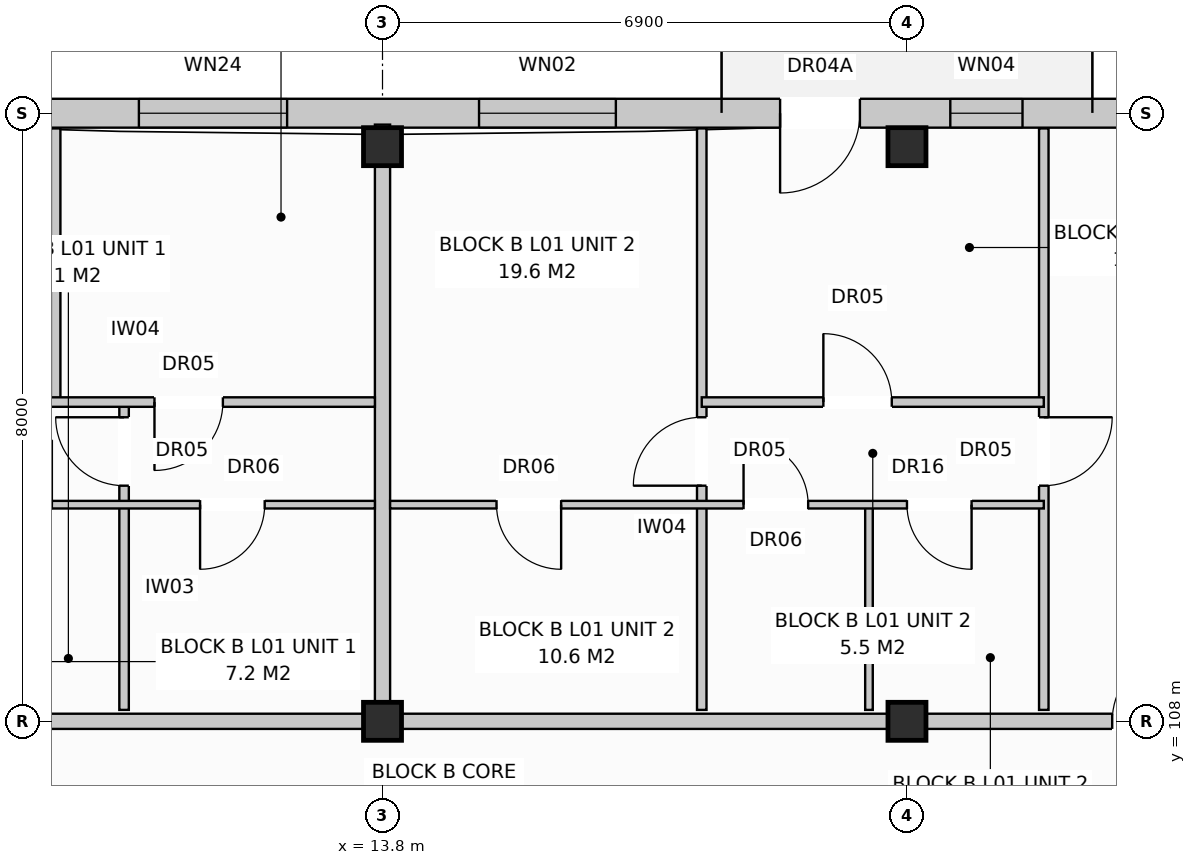
"""IFC4 building model, lengths in metres.
Left out: names, types, materials, properties, quantities, classifications, styles, units other than length and angle.
Written with IfcOpenShell. Run it as: python <this file> out.ifc"""

import sys

from ifc_helpers import new_model, si_unit, direction, frame, frame_2d, origin, origin_with_axes, origin_2d, place, context, subcontext, project, spatial, rectangle, extrude, element, fill, save


model = new_model("IFC4")
c1 = context("Model", 3, precision=1e-05, world=origin(), true_north=direction((0.0, 1.0)))
c2 = subcontext(c1, "Body", "Model", "MODEL_VIEW")
j1 = project(units=[si_unit("LENGTHUNIT", "METRE"), si_unit("PLANEANGLEUNIT", "RADIAN")], contexts=[c1])
p1 = place(None, origin())
s1 = spatial("IfcSite", under=j1, at=p1, CompositionType="ELEMENT")
p2 = place(p1, origin())
s2 = spatial("IfcBuilding", under=s1, at=p2, CompositionType="ELEMENT")
p3 = place(p2, frame((0.0, 0.0, 4.4)))
s3 = spatial("IfcBuildingStorey", under=s2, at=p3, CompositionType="ELEMENT", Elevation=4.4)
for number, where, z_axis, x_axis in (
    (1, (13.8, 108.0, 0.0), (0.0, 0.0, 1.0), (1.0, 0.0, 0.0)),
    (2, (13.8, 115.56, 0.0), (0.0, 0.0, 1.0), (1.0, 0.0, 0.0)),
    (3, (20.7, 108.0, 0.0), (0.0, 0.0, 1.0), (1.0, 0.0, 0.0)),
    (4, (20.7, 115.56, 0.0), (0.0, 0.0, 1.0), (1.0, 0.0, 0.0)),
):
    element("IfcColumn", number, at=place(p3, frame(where, z_axis=z_axis, x_axis=x_axis)), inside=s3, PredefinedType="COLUMN", context=c2, shape_type="SweptSolid", body=[
        extrude(rectangle(XDim=0.5, YDim=0.5, at=origin_2d()), origin(), (0.0, 0.0, 1.0), 3.6),
    ])
p4 = place(p3, frame((0.18, 116.0, 0.0), z_axis=(0.0, 0.0, 1.0), x_axis=(1.0, 0.0, 0.0)))
e5 = element("IfcWall", 5, at=p4, inside=s3, PredefinedType="STANDARD", context=c2, shape_type="SweptSolid", body=[
    extrude(rectangle(XDim=54.84, YDim=0.38, at=frame_2d((27.42, 0.0))), origin(), (0.0, 0.0, 1.0), 3.33),
])
p5 = place(p4, frame((7.34, 0.0, 0.0)))
e6 = element("IfcOpeningElement", 6, at=p5, cuts=e5, PredefinedType="OPENING", context=c2, shape_type="SweptSolid", body=[
    extrude(rectangle(XDim=1.05, YDim=2.12, at=frame_2d((0.525, 1.06))), frame((0.0, 0.202, 0.0), z_axis=(0.0, -1.0, 0.0), x_axis=(1.0, 0.0, 0.0)), (0.0, 0.0, 1.0), 0.404),
])
p6 = place(p4, frame((18.851, 0.0, 0.0)))
e7 = element("IfcOpeningElement", 7, at=p6, cuts=e5, PredefinedType="OPENING", context=c2, shape_type="SweptSolid", body=[
    extrude(rectangle(XDim=1.05, YDim=2.12, at=frame_2d((0.525, 1.06))), frame((0.0, 0.202, 0.0), z_axis=(0.0, -1.0, 0.0), x_axis=(1.0, 0.0, 0.0)), (0.0, 0.0, 1.0), 0.404),
])
p7 = place(p4, frame((32.651, 0.0, 0.0)))
e8 = element("IfcOpeningElement", 8, at=p7, cuts=e5, PredefinedType="OPENING", context=c2, shape_type="SweptSolid", body=[
    extrude(rectangle(XDim=1.05, YDim=2.12, at=frame_2d((0.525, 1.06))), frame((0.0, 0.202, 0.0), z_axis=(0.0, -1.0, 0.0), x_axis=(1.0, 0.0, 0.0)), (0.0, 0.0, 1.0), 0.404),
])
p8 = place(p4, frame((48.74, 0.0, 0.0)))
e9 = element("IfcOpeningElement", 9, at=p8, cuts=e5, PredefinedType="OPENING", context=c2, shape_type="SweptSolid", body=[
    extrude(rectangle(XDim=1.05, YDim=2.12, at=frame_2d((0.525, 1.06))), frame((0.0, 0.202, 0.0), z_axis=(0.0, -1.0, 0.0), x_axis=(1.0, 0.0, 0.0)), (0.0, 0.0, 1.0), 0.404),
])
p9 = place(p4, frame((1.54, 0.0, 0.8)))
e10 = element("IfcOpeningElement", 10, at=p9, cuts=e5, PredefinedType="OPENING", context=c2, shape_type="SweptSolid", body=[
    extrude(rectangle(XDim=1.9, YDim=1.85, at=frame_2d((0.95, 0.925))), frame((0.0, 0.202, 0.0), z_axis=(0.0, -1.0, 0.0), x_axis=(1.0, 0.0, 0.0)), (0.0, 0.0, 1.0), 0.404),
])
p10 = place(p4, frame((10.415, 0.0, 0.8)))
e11 = element("IfcOpeningElement", 11, at=p10, cuts=e5, PredefinedType="OPENING", context=c2, shape_type="SweptSolid", body=[
    extrude(rectangle(XDim=1.95, YDim=1.65, at=frame_2d((0.975, 0.825))), frame((0.0, 0.202, 0.0), z_axis=(0.0, -1.0, 0.0), x_axis=(1.0, 0.0, 0.0)), (0.0, 0.0, 1.0), 0.404),
])
p11 = place(p4, frame((14.89, 0.0, 0.8)))
e12 = element("IfcOpeningElement", 12, at=p11, cuts=e5, PredefinedType="OPENING", context=c2, shape_type="SweptSolid", body=[
    extrude(rectangle(XDim=1.8, YDim=1.7, at=frame_2d((0.9, 0.85))), frame((0.0, 0.202, 0.0), z_axis=(0.0, -1.0, 0.0), x_axis=(1.0, 0.0, 0.0)), (0.0, 0.0, 1.0), 0.404),
])
p12 = place(p4, frame((21.09, 0.0, 0.9)))
e13 = element("IfcOpeningElement", 13, at=p12, cuts=e5, PredefinedType="OPENING", context=c2, shape_type="SweptSolid", body=[
    extrude(rectangle(XDim=0.95, YDim=1.55, at=frame_2d((0.475, 0.775))), frame((0.0, 0.202, 0.0), z_axis=(0.0, -1.0, 0.0), x_axis=(1.0, 0.0, 0.0)), (0.0, 0.0, 1.0), 0.404),
])
p13 = place(p4, frame((23.815, 0.0, 0.8)))
e14 = element("IfcOpeningElement", 14, at=p13, cuts=e5, PredefinedType="OPENING", context=c2, shape_type="SweptSolid", body=[
    extrude(rectangle(XDim=1.95, YDim=1.65, at=frame_2d((0.975, 0.825))), frame((0.0, 0.202, 0.0), z_axis=(0.0, -1.0, 0.0), x_axis=(1.0, 0.0, 0.0)), (0.0, 0.0, 1.0), 0.404),
])
p14 = place(p4, frame((28.49, 0.0, 0.8)))
e15 = element("IfcOpeningElement", 15, at=p14, cuts=e5, PredefinedType="OPENING", context=c2, shape_type="SweptSolid", body=[
    extrude(rectangle(XDim=1.8, YDim=1.7, at=frame_2d((0.9, 0.85))), frame((0.0, 0.202, 0.0), z_axis=(0.0, -1.0, 0.0), x_axis=(1.0, 0.0, 0.0)), (0.0, 0.0, 1.0), 0.404),
])
p15 = place(p4, frame((35.34, 0.0, 0.8)))
e16 = element("IfcOpeningElement", 16, at=p15, cuts=e5, PredefinedType="OPENING", context=c2, shape_type="SweptSolid", body=[
    extrude(rectangle(XDim=1.9, YDim=1.85, at=frame_2d((0.95, 0.925))), frame((0.0, 0.202, 0.0), z_axis=(0.0, -1.0, 0.0), x_axis=(1.0, 0.0, 0.0)), (0.0, 0.0, 1.0), 0.404),
])
p16 = place(p4, frame((38.455, 0.0, 0.8)))
e17 = element("IfcOpeningElement", 17, at=p16, cuts=e5, PredefinedType="OPENING", context=c2, shape_type="SweptSolid", body=[
    extrude(rectangle(XDim=1.95, YDim=1.65, at=frame_2d((0.975, 0.825))), frame((0.0, 0.202, 0.0), z_axis=(0.0, -1.0, 0.0), x_axis=(1.0, 0.0, 0.0)), (0.0, 0.0, 1.0), 0.404),
])
p17 = place(p4, frame((42.99, 0.0, 0.8)))
e18 = element("IfcOpeningElement", 18, at=p17, cuts=e5, PredefinedType="OPENING", context=c2, shape_type="SweptSolid", body=[
    extrude(rectangle(XDim=1.8, YDim=1.7, at=frame_2d((0.9, 0.85))), frame((0.0, 0.202, 0.0), z_axis=(0.0, -1.0, 0.0), x_axis=(1.0, 0.0, 0.0)), (0.0, 0.0, 1.0), 0.404),
])
p18 = place(p4, frame((51.84, 0.0, 0.8)))
e19 = element("IfcOpeningElement", 19, at=p18, cuts=e5, PredefinedType="OPENING", context=c2, shape_type="SweptSolid", body=[
    extrude(rectangle(XDim=1.9, YDim=1.85, at=frame_2d((0.95, 0.925))), frame((0.0, 0.202, 0.0), z_axis=(0.0, -1.0, 0.0), x_axis=(1.0, 0.0, 0.0)), (0.0, 0.0, 1.0), 0.404),
])
p19 = place(p3, frame((13.8, 108.15, 0.0), z_axis=(0.0, 0.0, 1.0), x_axis=(0.0, 1.0, 0.0)))
e20 = element("IfcWall", 20, at=p19, inside=s3, PredefinedType="PARTITIONING", context=c2, shape_type="SweptSolid", body=[
    extrude(rectangle(XDim=7.7, YDim=0.2, at=frame_2d((3.85, 0.0))), origin(), (0.0, 0.0, 1.0), 3.33),
])
p20 = place(p3, frame((0.0, 108.0, 0.0), z_axis=(0.0, 0.0, 1.0), x_axis=(1.0, 0.0, 0.0)))
e21 = element("IfcWall", 21, at=p20, inside=s3, PredefinedType="PARTITIONING", context=c2, shape_type="SweptSolid", body=[
    extrude(rectangle(XDim=13.8, YDim=0.2, at=frame_2d((6.9, 0.0))), origin(), (0.0, 0.0, 1.0), 2.77),
])
p21 = place(p20, frame((2.4, 0.0, 0.0)))
e22 = element("IfcOpeningElement", 22, at=p21, cuts=e21, PredefinedType="OPENING", context=c2, shape_type="SweptSolid", body=[
    extrude(rectangle(XDim=0.95, YDim=2.15, at=frame_2d((0.475, 1.075))), frame((0.0, 0.112, 0.0), z_axis=(0.0, -1.0, 0.0), x_axis=(1.0, 0.0, 0.0)), (0.0, 0.0, 1.0), 0.224),
])
p22 = place(p3, frame((10.4, 108.15, 0.0), z_axis=(0.0, 0.0, 1.0), x_axis=(0.0, 1.0, 0.0)))
e23 = element("IfcWall", 23, at=p22, inside=s3, PredefinedType="PARTITIONING", context=c2, shape_type="SweptSolid", body=[
    extrude(rectangle(XDim=4.05, YDim=0.125, at=frame_2d((2.025, 0.0))), origin(), (0.0, 0.0, 1.0), 2.99),
])
p23 = place(p22, frame((2.95, 0.0, 0.0)))
e24 = element("IfcOpeningElement", 24, at=p23, cuts=e23, PredefinedType="OPENING", context=c2, shape_type="SweptSolid", body=[
    extrude(rectangle(XDim=0.9, YDim=2.1, at=frame_2d((0.45, 1.05))), frame((0.0, 0.074, 0.0), z_axis=(0.0, -1.0, 0.0), x_axis=(1.0, 0.0, 0.0)), (0.0, 0.0, 1.0), 0.149),
])
p24 = place(p3, frame((9.5, 112.2, 0.0), z_axis=(0.0, 0.0, 1.0), x_axis=(0.0, 1.0, 0.0)))
e25 = element("IfcWall", 25, at=p24, inside=s3, PredefinedType="PARTITIONING", context=c2, shape_type="SweptSolid", body=[
    extrude(rectangle(XDim=3.6, YDim=0.125, at=frame_2d((1.8, 0.0))), origin(), (0.0, 0.0, 1.0), 3.33),
])
p25 = place(p3, frame((5.2, 110.85, 0.0), z_axis=(0.0, 0.0, 1.0), x_axis=(1.0, 0.0, 0.0)))
e26 = element("IfcWall", 26, at=p25, inside=s3, PredefinedType="PARTITIONING", context=c2, shape_type="SweptSolid", body=[
    extrude(rectangle(XDim=8.5, YDim=0.1, at=frame_2d((4.25, 0.0))), origin(), (0.0, 0.0, 1.0), 3.33),
])
p26 = place(p25, frame((1.0, 0.0, 0.0)))
e27 = element("IfcOpeningElement", 27, at=p26, cuts=e26, PredefinedType="OPENING", context=c2, shape_type="SweptSolid", body=[
    extrude(rectangle(XDim=0.85, YDim=2.1, at=frame_2d((0.425, 1.05))), frame((0.0, 0.062, 0.0), z_axis=(0.0, -1.0, 0.0), x_axis=(1.0, 0.0, 0.0)), (0.0, 0.0, 1.0), 0.124),
])
p27 = place(p25, frame((3.4, 0.0, 0.0)))
e28 = element("IfcOpeningElement", 28, at=p27, cuts=e26, PredefinedType="OPENING", context=c2, shape_type="SweptSolid", body=[
    extrude(rectangle(XDim=0.85, YDim=2.05, at=frame_2d((0.425, 1.025))), frame((0.0, 0.062, 0.0), z_axis=(0.0, -1.0, 0.0), x_axis=(1.0, 0.0, 0.0)), (0.0, 0.0, 1.0), 0.124),
])
p28 = place(p25, frame((6.2, 0.0, 0.0)))
e29 = element("IfcOpeningElement", 29, at=p28, cuts=e26, PredefinedType="OPENING", context=c2, shape_type="SweptSolid", body=[
    extrude(rectangle(XDim=0.85, YDim=2.05, at=frame_2d((0.425, 1.025))), frame((0.0, 0.062, 0.0), z_axis=(0.0, -1.0, 0.0), x_axis=(1.0, 0.0, 0.0)), (0.0, 0.0, 1.0), 0.124),
])
p29 = place(p3, frame((5.2, 112.2, 0.0), z_axis=(0.0, 0.0, 1.0), x_axis=(1.0, 0.0, 0.0)))
e30 = element("IfcWall", 30, at=p29, inside=s3, PredefinedType="PARTITIONING", context=c2, shape_type="SweptSolid", body=[
    extrude(rectangle(XDim=8.5, YDim=0.125, at=frame_2d((4.25, 0.0))), origin(), (0.0, 0.0, 1.0), 3.33),
])
p30 = place(p29, frame((1.5, 0.0, 0.0)))
e31 = element("IfcOpeningElement", 31, at=p30, cuts=e30, PredefinedType="OPENING", context=c2, shape_type="SweptSolid", body=[
    extrude(rectangle(XDim=0.9, YDim=2.1, at=frame_2d((0.45, 1.05))), frame((0.0, 0.074, 0.0), z_axis=(0.0, -1.0, 0.0), x_axis=(1.0, 0.0, 0.0)), (0.0, 0.0, 1.0), 0.149),
])
p31 = place(p29, frame((5.6, 0.0, 0.0)))
e32 = element("IfcOpeningElement", 32, at=p31, cuts=e30, PredefinedType="OPENING", context=c2, shape_type="SweptSolid", body=[
    extrude(rectangle(XDim=0.9, YDim=2.1, at=frame_2d((0.45, 1.05))), frame((0.0, 0.074, 0.0), z_axis=(0.0, -1.0, 0.0), x_axis=(1.0, 0.0, 0.0)), (0.0, 0.0, 1.0), 0.149),
])
p32 = place(p3, frame((13.8, 108.0, 0.0), z_axis=(0.0, 0.0, 1.0), x_axis=(1.0, 0.0, 0.0)))
e33 = element("IfcWall", 33, at=p32, inside=s3, PredefinedType="PARTITIONING", context=c2, shape_type="SweptSolid", body=[
    extrude(rectangle(XDim=13.8, YDim=0.2, at=frame_2d((6.9, 0.0))), origin(), (0.0, 0.0, 1.0), 2.77),
])
p33 = place(p32, frame((9.6, 0.0, 0.0)))
e34 = element("IfcOpeningElement", 34, at=p33, cuts=e33, PredefinedType="OPENING", context=c2, shape_type="SweptSolid", body=[
    extrude(rectangle(XDim=0.95, YDim=2.15, at=frame_2d((0.475, 1.075))), frame((0.0, 0.112, 0.0), z_axis=(0.0, -1.0, 0.0), x_axis=(1.0, 0.0, 0.0)), (0.0, 0.0, 1.0), 0.224),
])
p34 = place(p3, frame((22.5, 108.15, 0.0), z_axis=(0.0, 0.0, 1.0), x_axis=(0.0, 1.0, 0.0)))
e35 = element("IfcWall", 35, at=p34, inside=s3, PredefinedType="PARTITIONING", context=c2, shape_type="SweptSolid", body=[
    extrude(rectangle(XDim=7.65, YDim=0.125, at=frame_2d((3.825, 0.0))), origin(), (0.0, 0.0, 1.0), 3.33),
])
p35 = place(p34, frame((2.95, 0.0, 0.0)))
e36 = element("IfcOpeningElement", 36, at=p35, cuts=e35, PredefinedType="OPENING", context=c2, shape_type="SweptSolid", body=[
    extrude(rectangle(XDim=0.9, YDim=2.1, at=frame_2d((0.45, 1.05))), frame((0.0, 0.074, 0.0), z_axis=(0.0, -1.0, 0.0), x_axis=(1.0, 0.0, 0.0)), (0.0, 0.0, 1.0), 0.149),
])
p36 = place(p3, frame((18.0, 108.15, 0.0), z_axis=(0.0, 0.0, 1.0), x_axis=(0.0, 1.0, 0.0)))
e37 = element("IfcWall", 37, at=p36, inside=s3, PredefinedType="PARTITIONING", context=c2, shape_type="SweptSolid", body=[
    extrude(rectangle(XDim=7.65, YDim=0.125, at=frame_2d((3.825, 0.0))), origin(), (0.0, 0.0, 1.0), 3.33),
])
p37 = place(p36, frame((2.95, 0.0, 0.0)))
e38 = element("IfcOpeningElement", 38, at=p37, cuts=e37, PredefinedType="OPENING", context=c2, shape_type="SweptSolid", body=[
    extrude(rectangle(XDim=0.9, YDim=2.1, at=frame_2d((0.45, 1.05))), frame((0.0, 0.074, 0.0), z_axis=(0.0, -1.0, 0.0), x_axis=(1.0, 0.0, 0.0)), (0.0, 0.0, 1.0), 0.149),
])
p38 = place(p3, frame((20.2, 108.15, 0.0), z_axis=(0.0, 0.0, 1.0), x_axis=(0.0, 1.0, 0.0)))
e39 = element("IfcWall", 39, at=p38, inside=s3, PredefinedType="PARTITIONING", context=c2, shape_type="SweptSolid", body=[
    extrude(rectangle(XDim=2.7, YDim=0.1, at=frame_2d((1.35, 0.0))), origin(), (0.0, 0.0, 1.0), 3.33),
])
p39 = place(p3, frame((13.9, 110.85, 0.0), z_axis=(0.0, 0.0, 1.0), x_axis=(1.0, 0.0, 0.0)))
e40 = element("IfcWall", 40, at=p39, inside=s3, PredefinedType="PARTITIONING", context=c2, shape_type="SweptSolid", body=[
    extrude(rectangle(XDim=8.6, YDim=0.1, at=frame_2d((4.3, 0.0))), origin(), (0.0, 0.0, 1.0), 3.33),
])
p40 = place(p39, frame((1.4, 0.0, 0.0)))
e41 = element("IfcOpeningElement", 41, at=p40, cuts=e40, PredefinedType="OPENING", context=c2, shape_type="SweptSolid", body=[
    extrude(rectangle(XDim=0.85, YDim=2.05, at=frame_2d((0.425, 1.025))), frame((0.0, 0.062, 0.0), z_axis=(0.0, -1.0, 0.0), x_axis=(1.0, 0.0, 0.0)), (0.0, 0.0, 1.0), 0.124),
])
p41 = place(p39, frame((4.65, 0.0, 0.0)))
e42 = element("IfcOpeningElement", 42, at=p41, cuts=e40, PredefinedType="OPENING", context=c2, shape_type="SweptSolid", body=[
    extrude(rectangle(XDim=0.85, YDim=2.05, at=frame_2d((0.425, 1.025))), frame((0.0, 0.062, 0.0), z_axis=(0.0, -1.0, 0.0), x_axis=(1.0, 0.0, 0.0)), (0.0, 0.0, 1.0), 0.124),
])
p42 = place(p39, frame((6.8, 0.0, 0.0)))
e43 = element("IfcOpeningElement", 43, at=p42, cuts=e40, PredefinedType="OPENING", context=c2, shape_type="SweptSolid", body=[
    extrude(rectangle(XDim=0.85, YDim=2.1, at=frame_2d((0.425, 1.05))), frame((0.0, 0.062, 0.0), z_axis=(0.0, -1.0, 0.0), x_axis=(1.0, 0.0, 0.0)), (0.0, 0.0, 1.0), 0.124),
])
p43 = place(p3, frame((18.0, 112.2, 0.0), z_axis=(0.0, 0.0, 1.0), x_axis=(1.0, 0.0, 0.0)))
e44 = element("IfcWall", 44, at=p43, inside=s3, PredefinedType="PARTITIONING", context=c2, shape_type="SweptSolid", body=[
    extrude(rectangle(XDim=4.5, YDim=0.125, at=frame_2d((2.25, 0.0))), origin(), (0.0, 0.0, 1.0), 3.33),
])
p44 = place(p43, frame((1.6, 0.0, 0.0)))
e45 = element("IfcOpeningElement", 45, at=p44, cuts=e44, PredefinedType="OPENING", context=c2, shape_type="SweptSolid", body=[
    extrude(rectangle(XDim=0.9, YDim=2.1, at=frame_2d((0.45, 1.05))), frame((0.0, 0.074, 0.0), z_axis=(0.0, -1.0, 0.0), x_axis=(1.0, 0.0, 0.0)), (0.0, 0.0, 1.0), 0.149),
])
p45 = place(p6, frame((1.05, 0.0, 0.0), z_axis=(0.0, 0.0, 1.0), x_axis=(-1.0, 0.0, 0.0)))
e46 = element("IfcDoor", 46, at=p45, inside=s3, OperationType="SINGLE_SWING_LEFT", PredefinedType="DOOR", context=c2, shape_type="SweptSolid", body=[
    extrude(rectangle(XDim=1.05, YDim=2.12, at=frame_2d((0.525, 1.06))), frame((0.0, 0.025, 0.0), z_axis=(0.0, -1.0, 0.0), x_axis=(1.0, 0.0, 0.0)), (0.0, 0.0, 1.0), 0.05),
])
fill(e7, e46)
p46 = place(p10, origin_with_axes())
e47 = element("IfcWindow", 47, at=p46, inside=s3, PartitioningType="SINGLE_PANEL", PredefinedType="WINDOW", context=c2, shape_type="SweptSolid", body=[
    extrude(rectangle(XDim=1.95, YDim=1.65, at=frame_2d((0.975, 0.825))), frame((0.0, 0.03, 0.0), z_axis=(0.0, -1.0, 0.0), x_axis=(1.0, 0.0, 0.0)), (0.0, 0.0, 1.0), 0.06),
])
fill(e11, e47)
p47 = place(p11, origin_with_axes())
e48 = element("IfcWindow", 48, at=p47, inside=s3, PartitioningType="SINGLE_PANEL", PredefinedType="WINDOW", context=c2, shape_type="SweptSolid", body=[
    extrude(rectangle(XDim=1.8, YDim=1.7, at=frame_2d((0.9, 0.85))), frame((0.0, 0.03, 0.0), z_axis=(0.0, -1.0, 0.0), x_axis=(1.0, 0.0, 0.0)), (0.0, 0.0, 1.0), 0.06),
])
fill(e12, e48)
p48 = place(p12, origin_with_axes())
e49 = element("IfcWindow", 49, at=p48, inside=s3, PartitioningType="SINGLE_PANEL", PredefinedType="WINDOW", context=c2, shape_type="SweptSolid", body=[
    extrude(rectangle(XDim=0.95, YDim=1.55, at=frame_2d((0.475, 0.775))), frame((0.0, 0.03, 0.0), z_axis=(0.0, -1.0, 0.0), x_axis=(1.0, 0.0, 0.0)), (0.0, 0.0, 1.0), 0.06),
])
fill(e13, e49)
p49 = place(p23, origin_with_axes())
e50 = element("IfcDoor", 50, at=p49, inside=s3, OperationType="SINGLE_SWING_RIGHT", PredefinedType="DOOR", context=c2, shape_type="SweptSolid", body=[
    extrude(rectangle(XDim=0.9, YDim=2.1, at=frame_2d((0.45, 1.05))), frame((0.0, 0.025, 0.0), z_axis=(0.0, -1.0, 0.0), x_axis=(1.0, 0.0, 0.0)), (0.0, 0.0, 1.0), 0.05),
])
fill(e24, e50)
p50 = place(p28, frame((0.85, 0.0, 0.0), z_axis=(0.0, 0.0, 1.0), x_axis=(-1.0, 0.0, 0.0)))
e51 = element("IfcDoor", 51, at=p50, inside=s3, OperationType="SINGLE_SWING_LEFT", PredefinedType="DOOR", context=c2, shape_type="SweptSolid", body=[
    extrude(rectangle(XDim=0.85, YDim=2.05, at=frame_2d((0.425, 1.025))), frame((0.0, 0.025, 0.0), z_axis=(0.0, -1.0, 0.0), x_axis=(1.0, 0.0, 0.0)), (0.0, 0.0, 1.0), 0.05),
])
fill(e29, e51)
p51 = place(p31, frame((0.9, 0.0, 0.0), z_axis=(0.0, 0.0, 1.0), x_axis=(-1.0, 0.0, 0.0)))
e52 = element("IfcDoor", 52, at=p51, inside=s3, OperationType="SINGLE_SWING_LEFT", PredefinedType="DOOR", context=c2, shape_type="SweptSolid", body=[
    extrude(rectangle(XDim=0.9, YDim=2.1, at=frame_2d((0.45, 1.05))), frame((0.0, 0.025, 0.0), z_axis=(0.0, -1.0, 0.0), x_axis=(1.0, 0.0, 0.0)), (0.0, 0.0, 1.0), 0.05),
])
fill(e32, e52)
p52 = place(p33, origin_with_axes())
e53 = element("IfcDoor", 53, at=p52, inside=s3, OperationType="SINGLE_SWING_RIGHT", PredefinedType="DOOR", context=c2, shape_type="SweptSolid", body=[
    extrude(rectangle(XDim=0.95, YDim=2.15, at=frame_2d((0.475, 1.075))), frame((0.0, 0.025, 0.0), z_axis=(0.0, -1.0, 0.0), x_axis=(1.0, 0.0, 0.0)), (0.0, 0.0, 1.0), 0.05),
])
fill(e34, e53)
p53 = place(p35, frame((0.9, 0.0, 0.0), z_axis=(0.0, 0.0, 1.0), x_axis=(-1.0, 0.0, 0.0)))
e54 = element("IfcDoor", 54, at=p53, inside=s3, OperationType="SINGLE_SWING_RIGHT", PredefinedType="DOOR", context=c2, shape_type="SweptSolid", body=[
    extrude(rectangle(XDim=0.9, YDim=2.1, at=frame_2d((0.45, 1.05))), frame((0.0, 0.025, 0.0), z_axis=(0.0, -1.0, 0.0), x_axis=(1.0, 0.0, 0.0)), (0.0, 0.0, 1.0), 0.05),
])
fill(e36, e54)
p54 = place(p37, origin_with_axes())
e55 = element("IfcDoor", 55, at=p54, inside=s3, OperationType="SINGLE_SWING_LEFT", PredefinedType="DOOR", context=c2, shape_type="SweptSolid", body=[
    extrude(rectangle(XDim=0.9, YDim=2.1, at=frame_2d((0.45, 1.05))), frame((0.0, 0.025, 0.0), z_axis=(0.0, -1.0, 0.0), x_axis=(1.0, 0.0, 0.0)), (0.0, 0.0, 1.0), 0.05),
])
fill(e38, e55)
p55 = place(p40, frame((0.85, 0.0, 0.0), z_axis=(0.0, 0.0, 1.0), x_axis=(-1.0, 0.0, 0.0)))
e56 = element("IfcDoor", 56, at=p55, inside=s3, OperationType="SINGLE_SWING_RIGHT", PredefinedType="DOOR", context=c2, shape_type="SweptSolid", body=[
    extrude(rectangle(XDim=0.85, YDim=2.05, at=frame_2d((0.425, 1.025))), frame((0.0, 0.025, 0.0), z_axis=(0.0, -1.0, 0.0), x_axis=(1.0, 0.0, 0.0)), (0.0, 0.0, 1.0), 0.05),
])
fill(e41, e56)
p56 = place(p41, origin_with_axes())
e57 = element("IfcDoor", 57, at=p56, inside=s3, OperationType="SINGLE_SWING_LEFT", PredefinedType="DOOR", context=c2, shape_type="SweptSolid", body=[
    extrude(rectangle(XDim=0.85, YDim=2.05, at=frame_2d((0.425, 1.025))), frame((0.0, 0.025, 0.0), z_axis=(0.0, -1.0, 0.0), x_axis=(1.0, 0.0, 0.0)), (0.0, 0.0, 1.0), 0.05),
])
fill(e42, e57)
p57 = place(p42, frame((0.85, 0.0, 0.0), z_axis=(0.0, 0.0, 1.0), x_axis=(-1.0, 0.0, 0.0)))
e58 = element("IfcDoor", 58, at=p57, inside=s3, OperationType="SINGLE_SWING_RIGHT", PredefinedType="DOOR", context=c2, shape_type="SweptSolid", body=[
    extrude(rectangle(XDim=0.85, YDim=2.1, at=frame_2d((0.425, 1.05))), frame((0.0, 0.025, 0.0), z_axis=(0.0, -1.0, 0.0), x_axis=(1.0, 0.0, 0.0)), (0.0, 0.0, 1.0), 0.05),
])
fill(e43, e58)
p58 = place(p44, origin_with_axes())
e59 = element("IfcDoor", 59, at=p58, inside=s3, OperationType="SINGLE_SWING_LEFT", PredefinedType="DOOR", context=c2, shape_type="SweptSolid", body=[
    extrude(rectangle(XDim=0.9, YDim=2.1, at=frame_2d((0.45, 1.05))), frame((0.0, 0.025, 0.0), z_axis=(0.0, -1.0, 0.0), x_axis=(1.0, 0.0, 0.0)), (0.0, 0.0, 1.0), 0.05),
])
fill(e45, e59)
save(model, sys.argv[1])
